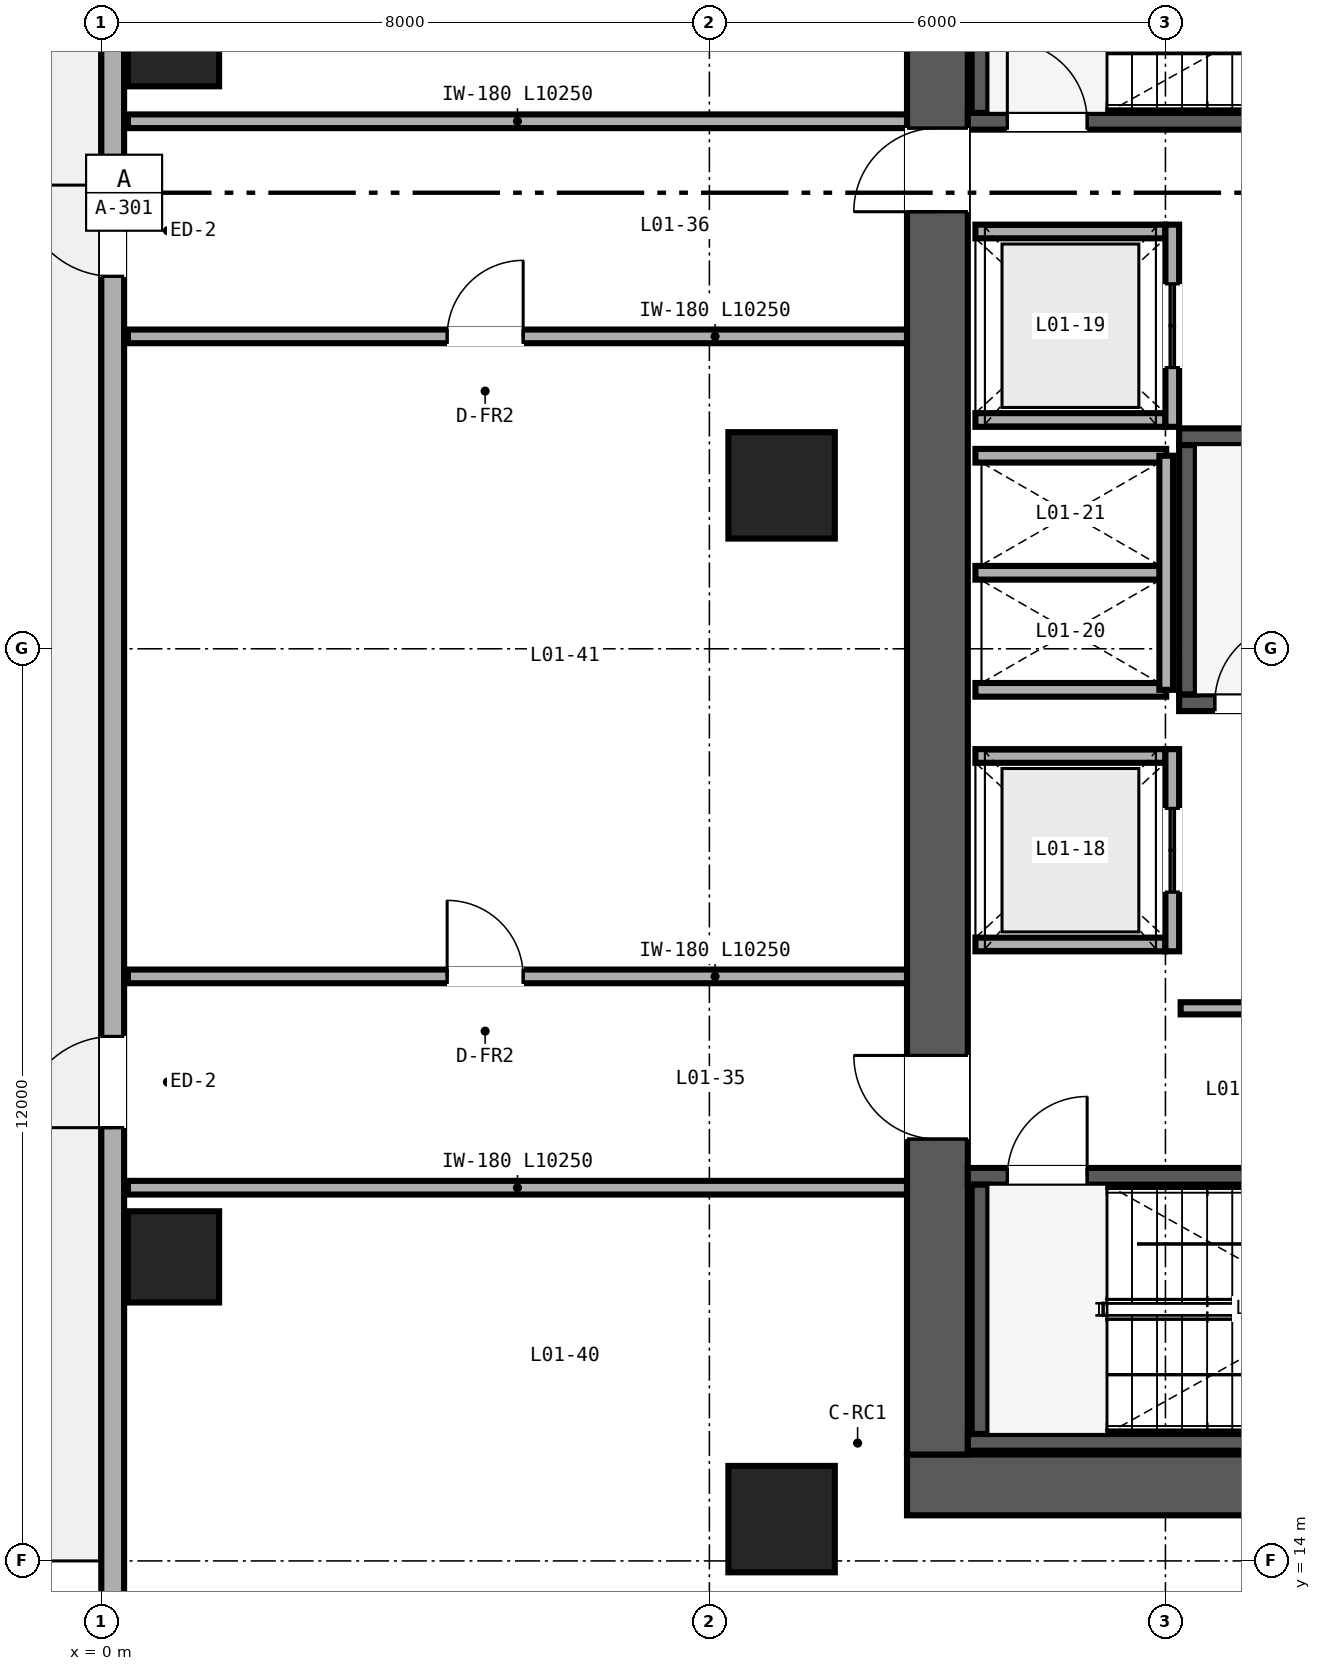
"""IFC4 building model, lengths in metres.
Left out: names, types, materials, properties, quantities, classifications, styles, units other than length and angle.
Written with IfcOpenShell. Run it as: python <this file> out.ifc"""

import sys

from ifc_helpers import new_model, si_unit, direction, frame, frame_2d, origin, origin_2d, place, context, subcontext, project, spatial, rectangle, extrude, source, transform, mapped, element, fill, save


model = new_model("IFC4")
c1 = context("Model", 3, precision=1e-05, world=origin(), true_north=direction((0.0, 1.0)))
c2 = subcontext(c1, "Body", "Model", "MODEL_VIEW")
j1 = project(units=[si_unit("LENGTHUNIT", "METRE"), si_unit("PLANEANGLEUNIT", "RADIAN")], contexts=[c1])
p1 = place(None, origin())
s1 = spatial("IfcSite", under=j1, at=p1, CompositionType="ELEMENT")
p2 = place(p1, origin())
s2 = spatial("IfcBuilding", under=s1, at=p2, CompositionType="ELEMENT")
p3 = place(p2, origin())
s3 = spatial("IfcBuildingStorey", under=s2, at=p3, CompositionType="ELEMENT", Elevation=0.0)
p4 = place(p3, frame((10.6, 15.0, 0.0), z_axis=(0.0, 0.0, 1.0), x_axis=(1.0, 0.0, 0.0)))
e1 = element("IfcWall", 1, at=p4, inside=s3, PredefinedType="SHEAR", context=c2, shape_type="SweptSolid", body=[
    extrude(rectangle(XDim=12.8, YDim=0.8, at=frame_2d((6.4, 0.0))), origin(), (0.0, 0.0, 1.0), 5.71),
])
p5 = place(p4, frame((10.3, 0.0, 0.0)))
e2 = element("IfcOpeningElement", 2, at=p5, cuts=e1, PredefinedType="OPENING", context=c2, shape_type="SweptSolid", body=[
    extrude(rectangle(XDim=1.0, YDim=2.15, at=frame_2d((0.5, 1.075))), frame((0.0, 0.41, 0.0), z_axis=(0.0, -1.0, 0.0), x_axis=(1.0, 0.0, 0.0)), (0.0, 0.0, 1.0), 0.82),
])
p6 = place(p3, frame((11.0, 15.4, 0.0), z_axis=(0.0, 0.0, 1.0), x_axis=(0.0, 1.0, 0.0)))
e3 = element("IfcWall", 3, at=p6, inside=s3, PredefinedType="SHEAR", context=c2, shape_type="SweptSolid", body=[
    extrude(rectangle(XDim=21.2, YDim=0.8, at=frame_2d((10.6, 0.0))), origin(), (0.0, 0.0, 1.0), 5.71),
])
p7 = place(p6, frame((4.15, 0.0, 0.0)))
e4 = element("IfcOpeningElement", 4, at=p7, cuts=e3, PredefinedType="OPENING", context=c2, shape_type="SweptSolid", body=[
    extrude(rectangle(XDim=1.1, YDim=2.15, at=frame_2d((0.55, 1.075))), frame((0.0, 0.41, 0.0), z_axis=(0.0, -1.0, 0.0), x_axis=(1.0, 0.0, 0.0)), (0.0, 0.0, 1.0), 0.82),
])
p8 = place(p6, frame((16.35, 0.0, 0.0)))
e5 = element("IfcOpeningElement", 5, at=p8, cuts=e3, PredefinedType="OPENING", context=c2, shape_type="SweptSolid", body=[
    extrude(rectangle(XDim=1.1, YDim=2.15, at=frame_2d((0.55, 1.075))), frame((0.0, 0.41, 0.0), z_axis=(0.0, -1.0, 0.0), x_axis=(1.0, 0.0, 0.0)), (0.0, 0.0, 1.0), 0.82),
])
p9 = place(p3, frame((11.4, 15.56, 0.0), z_axis=(0.0, 0.0, 1.0), x_axis=(1.0, 0.0, 0.0)))
e6 = element("IfcWall", 6, at=p9, inside=s3, PredefinedType="SHEAR", context=c2, shape_type="SweptSolid", body=[
    extrude(rectangle(XDim=7.91, YDim=0.22, at=frame_2d((3.955, 0.0))), origin(), (0.0, 0.0, 1.0), 5.8),
])
p10 = place(p3, frame((11.4, 19.06, 0.0), z_axis=(0.0, 0.0, 1.0), x_axis=(1.0, 0.0, 0.0)))
e7 = element("IfcWall", 7, at=p10, inside=s3, PredefinedType="SHEAR", context=c2, shape_type="SweptSolid", body=[
    extrude(rectangle(XDim=7.91, YDim=0.22, at=frame_2d((3.955, 0.0))), origin(), (0.0, 0.0, 1.0), 5.8),
])
p11 = place(p10, frame((0.52, 0.0, 0.0)))
e8 = element("IfcOpeningElement", 8, at=p11, cuts=e7, PredefinedType="OPENING", context=c2, shape_type="SweptSolid", body=[
    extrude(rectangle(XDim=1.05, YDim=2.15, at=frame_2d((0.525, 1.075))), frame((0.0, 0.12, 0.0), z_axis=(0.0, -1.0, 0.0), x_axis=(1.0, 0.0, 0.0)), (0.0, 0.0, 1.0), 0.24),
])
p12 = place(p3, frame((11.56, 15.67, 0.0), z_axis=(0.0, 0.0, 1.0), x_axis=(0.0, 1.0, 0.0)))
e9 = element("IfcWall", 9, at=p12, inside=s3, PredefinedType="SHEAR", context=c2, shape_type="SweptSolid", body=[
    extrude(rectangle(XDim=3.28, YDim=0.22, at=frame_2d((1.64, 0.0))), origin(), (0.0, 0.0, 1.0), 5.8),
])
p13 = place(p3, frame((11.4, 32.94, 0.0), z_axis=(0.0, 0.0, 1.0), x_axis=(1.0, 0.0, 0.0)))
e10 = element("IfcWall", 10, at=p13, inside=s3, PredefinedType="SHEAR", context=c2, shape_type="SweptSolid", body=[
    extrude(rectangle(XDim=7.91, YDim=0.22, at=frame_2d((3.955, 0.0))), origin(), (0.0, 0.0, 1.0), 5.8),
])
p14 = place(p13, frame((0.52, 0.0, 0.0)))
e11 = element("IfcOpeningElement", 11, at=p14, cuts=e10, PredefinedType="OPENING", context=c2, shape_type="SweptSolid", body=[
    extrude(rectangle(XDim=1.05, YDim=2.15, at=frame_2d((0.525, 1.075))), frame((0.0, 0.12, 0.0), z_axis=(0.0, -1.0, 0.0), x_axis=(1.0, 0.0, 0.0)), (0.0, 0.0, 1.0), 0.24),
])
p15 = place(p3, frame((11.56, 33.05, 0.0), z_axis=(0.0, 0.0, 1.0), x_axis=(0.0, 1.0, 0.0)))
e12 = element("IfcWall", 12, at=p15, inside=s3, PredefinedType="SHEAR", context=c2, shape_type="SweptSolid", body=[
    extrude(rectangle(XDim=3.28, YDim=0.22, at=frame_2d((1.64, 0.0))), origin(), (0.0, 0.0, 1.0), 5.8),
])
p16 = place(p3, frame((14.18, 25.29, 0.0), z_axis=(0.0, 0.0, 1.0), x_axis=(1.0, 0.0, 0.0)))
e13 = element("IfcWall", 13, at=p16, inside=s3, PredefinedType="SHEAR", context=c2, shape_type="SweptSolid", body=[
    extrude(rectangle(XDim=8.42, YDim=0.22, at=frame_2d((4.21, 0.0))), origin(), (0.0, 0.0, 1.0), 5.8),
])
p17 = place(p16, frame((0.47, 0.0, 0.0)))
e14 = element("IfcOpeningElement", 14, at=p17, cuts=e13, PredefinedType="OPENING", context=c2, shape_type="SweptSolid", body=[
    extrude(rectangle(XDim=1.05, YDim=2.15, at=frame_2d((0.525, 1.075))), frame((0.0, 0.12, 0.0), z_axis=(0.0, -1.0, 0.0), x_axis=(1.0, 0.0, 0.0)), (0.0, 0.0, 1.0), 0.24),
])
p18 = place(p3, frame((14.18, 28.79, 0.0), z_axis=(0.0, 0.0, 1.0), x_axis=(1.0, 0.0, 0.0)))
e15 = element("IfcWall", 15, at=p18, inside=s3, PredefinedType="SHEAR", context=c2, shape_type="SweptSolid", body=[
    extrude(rectangle(XDim=8.42, YDim=0.22, at=frame_2d((4.21, 0.0))), origin(), (0.0, 0.0, 1.0), 5.8),
])
p19 = place(p3, frame((14.29, 25.4, 0.0), z_axis=(0.0, 0.0, 1.0), x_axis=(0.0, 1.0, 0.0)))
e16 = element("IfcWall", 16, at=p19, inside=s3, PredefinedType="SHEAR", context=c2, shape_type="SweptSolid", body=[
    extrude(rectangle(XDim=3.28, YDim=0.22, at=frame_2d((1.64, 0.0))), origin(), (0.0, 0.0, 1.0), 5.8),
])
m1 = source(origin(), c2, "Body", "SweptSolid", [
    extrude(rectangle(XDim=1.2, YDim=1.2, at=origin_2d()), origin(), (0.0, 0.0, 1.0), 5.71),
])
for number, where, z_axis, x_axis in (
    (17, (0.95, 18.0, 0.0), (0.0, 0.0, 1.0), (1.0, 0.0, 0.0)),
    (18, (0.95, 34.0, 0.0), (0.0, 0.0, 1.0), (1.0, 0.0, 0.0)),
):
    element("IfcColumn", number, at=place(p3, frame(where, z_axis=z_axis, x_axis=x_axis)), inside=s3, PredefinedType="COLUMN", context=c2, shape_type="MappedRepresentation", body=[
        mapped(m1, transform((0.0, 0.0, 0.0), scale=1.0)),
    ])
m2 = source(origin(), c2, "Body", "SweptSolid", [
    extrude(rectangle(XDim=1.4, YDim=1.4, at=origin_2d()), origin(), (0.0, 0.0, 1.0), 5.71),
])
for number, where, z_axis, x_axis in (
    (19, (8.95, 14.55, 0.0), (0.0, 0.0, 1.0), (1.0, 0.0, 0.0)),
    (20, (8.95, 28.15, 0.0), (0.0, 0.0, 1.0), (1.0, 0.0, 0.0)),
):
    element("IfcColumn", number, at=place(p3, frame(where, z_axis=z_axis, x_axis=x_axis)), inside=s3, PredefinedType="COLUMN", context=c2, shape_type="MappedRepresentation", body=[
        mapped(m2, transform((0.0, 0.0, 0.0), scale=1.0)),
    ])
p20 = place(p3, frame((0.15, 0.3, 0.0), z_axis=(0.0, 0.0, 1.0), x_axis=(0.0, 1.0, 0.0)))
e21 = element("IfcWall", 21, at=p20, inside=s3, PredefinedType="SOLIDWALL", context=c2, shape_type="SweptSolid", body=[
    extrude(rectangle(XDim=51.4, YDim=0.3, at=frame_2d((25.7, 0.0))), origin(), (0.0, 0.0, 1.0), 5.71),
])
p21 = place(p20, frame((19.4, 0.0, 0.0)))
e22 = element("IfcOpeningElement", 22, at=p21, cuts=e21, PredefinedType="OPENING", context=c2, shape_type="SweptSolid", body=[
    extrude(rectangle(XDim=1.2, YDim=2.2, at=frame_2d((0.6, 1.1))), frame((0.0, 0.16, 0.0), z_axis=(0.0, -1.0, 0.0), x_axis=(1.0, 0.0, 0.0)), (0.0, 0.0, 1.0), 0.32),
])
p22 = place(p20, frame((30.6, 0.0, 0.0)))
e23 = element("IfcOpeningElement", 23, at=p22, cuts=e21, PredefinedType="OPENING", context=c2, shape_type="SweptSolid", body=[
    extrude(rectangle(XDim=1.2, YDim=2.2, at=frame_2d((0.6, 1.1))), frame((0.0, 0.16, 0.0), z_axis=(0.0, -1.0, 0.0), x_axis=(1.0, 0.0, 0.0)), (0.0, 0.0, 1.0), 0.32),
])
p23 = place(p20, frame((40.9, 0.0, 0.0)))
e24 = element("IfcOpeningElement", 24, at=p23, cuts=e21, PredefinedType="OPENING", context=c2, shape_type="SweptSolid", body=[
    extrude(rectangle(XDim=1.2, YDim=2.2, at=frame_2d((0.6, 1.1))), frame((0.0, 0.16, 0.0), z_axis=(0.0, -1.0, 0.0), x_axis=(1.0, 0.0, 0.0)), (0.0, 0.0, 1.0), 0.32),
])
for number, where, z_axis, x_axis in (
    (25, (11.5, 22.11, 0.0), (0.0, 0.0, 1.0), (1.0, 0.0, 0.0)),
    (26, (11.5, 24.59, 0.0), (0.0, 0.0, 1.0), (1.0, 0.0, 0.0)),
):
    element("IfcWall", number, at=place(p3, frame(where, z_axis=z_axis, x_axis=x_axis)), inside=s3, PredefinedType="SOLIDWALL", context=c2, shape_type="SweptSolid", body=[
        extrude(rectangle(XDim=2.5, YDim=0.18, at=frame_2d((1.25, 0.0))), origin(), (0.0, 0.0, 1.0), 5.71),
    ])
p24 = place(p3, frame((14.09, 22.02, 0.0), z_axis=(0.0, 0.0, 1.0), x_axis=(0.0, 1.0, 0.0)))
e27 = element("IfcWall", 27, at=p24, inside=s3, PredefinedType="SOLIDWALL", context=c2, shape_type="SweptSolid", body=[
    extrude(rectangle(XDim=2.66, YDim=0.18, at=frame_2d((1.33, 0.0))), origin(), (0.0, 0.0, 1.0), 5.71),
])
p25 = place(p24, frame((0.78, 0.0, 0.0)))
e28 = element("IfcOpeningElement", 28, at=p25, cuts=e27, PredefinedType="OPENING", context=c2, shape_type="SweptSolid", body=[
    extrude(rectangle(XDim=1.1, YDim=2.2, at=frame_2d((0.55, 1.1))), frame((0.0, 0.1, 0.0), z_axis=(0.0, -1.0, 0.0), x_axis=(1.0, 0.0, 0.0)), (0.0, 0.0, 1.0), 0.2),
])
for number, where, z_axis, x_axis in (
    (29, (11.5, 29.01, 0.0), (0.0, 0.0, 1.0), (1.0, 0.0, 0.0)),
    (30, (11.5, 31.49, 0.0), (0.0, 0.0, 1.0), (1.0, 0.0, 0.0)),
):
    element("IfcWall", number, at=place(p3, frame(where, z_axis=z_axis, x_axis=x_axis)), inside=s3, PredefinedType="SOLIDWALL", context=c2, shape_type="SweptSolid", body=[
        extrude(rectangle(XDim=2.5, YDim=0.18, at=frame_2d((1.25, 0.0))), origin(), (0.0, 0.0, 1.0), 5.71),
    ])
p26 = place(p3, frame((14.09, 28.92, 0.0), z_axis=(0.0, 0.0, 1.0), x_axis=(0.0, 1.0, 0.0)))
e31 = element("IfcWall", 31, at=p26, inside=s3, PredefinedType="SOLIDWALL", context=c2, shape_type="SweptSolid", body=[
    extrude(rectangle(XDim=2.66, YDim=0.18, at=frame_2d((1.33, 0.0))), origin(), (0.0, 0.0, 1.0), 5.71),
])
p27 = place(p26, frame((0.78, 0.0, 0.0)))
e32 = element("IfcOpeningElement", 32, at=p27, cuts=e31, PredefinedType="OPENING", context=c2, shape_type="SweptSolid", body=[
    extrude(rectangle(XDim=1.1, YDim=2.2, at=frame_2d((0.55, 1.1))), frame((0.0, 0.1, 0.0), z_axis=(0.0, -1.0, 0.0), x_axis=(1.0, 0.0, 0.0)), (0.0, 0.0, 1.0), 0.2),
])
for number, where, z_axis, x_axis in (
    (33, (11.5, 25.46, 0.0), (0.0, 0.0, 1.0), (1.0, 0.0, 0.0)),
    (34, (11.5, 27.0, 0.0), (0.0, 0.0, 1.0), (1.0, 0.0, 0.0)),
    (35, (11.5, 28.54, 0.0), (0.0, 0.0, 1.0), (1.0, 0.0, 0.0)),
):
    element("IfcWall", number, at=place(p3, frame(where, z_axis=z_axis, x_axis=x_axis)), inside=s3, PredefinedType="SOLIDWALL", context=c2, shape_type="SweptSolid", body=[
        extrude(rectangle(XDim=2.51, YDim=0.18, at=frame_2d((1.255, 0.0))), origin(), (0.0, 0.0, 1.0), 5.71),
    ])
p28 = place(p3, frame((14.01, 25.46, 0.0), z_axis=(0.0, 0.0, 1.0), x_axis=(0.0, 1.0, 0.0)))
e36 = element("IfcWall", 36, at=p28, inside=s3, PredefinedType="SOLIDWALL", context=c2, shape_type="SweptSolid", body=[
    extrude(rectangle(XDim=3.08, YDim=0.18, at=frame_2d((1.54, 0.0))), origin(), (0.0, 0.0, 1.0), 5.71),
])
p29 = place(p3, frame((14.2, 21.27, 0.0), z_axis=(0.0, 0.0, 1.0), x_axis=(1.0, 0.0, 0.0)))
e37 = element("IfcWall", 37, at=p29, inside=s3, PredefinedType="PARTITIONING", context=c2, shape_type="SweptSolid", body=[
    extrude(rectangle(XDim=4.58, YDim=0.16, at=frame_2d((2.29, 0.0))), origin(), (0.0, 0.0, 1.0), 5.71),
])
p30 = place(p29, frame((1.8, 0.0, 0.0)))
e38 = element("IfcOpeningElement", 38, at=p30, cuts=e37, PredefinedType="OPENING", context=c2, shape_type="SweptSolid", body=[
    extrude(rectangle(XDim=1.0, YDim=2.15, at=frame_2d((0.5, 1.075))), frame((0.0, 0.09, 0.0), z_axis=(0.0, -1.0, 0.0), x_axis=(1.0, 0.0, 0.0)), (0.0, 0.0, 1.0), 0.18),
])
p31 = place(p3, frame((0.35, 18.91, 0.0), z_axis=(0.0, 0.0, 1.0), x_axis=(1.0, 0.0, 0.0)))
e39 = element("IfcWall", 39, at=p31, inside=s3, PredefinedType="SOLIDWALL", context=c2, shape_type="SweptSolid", body=[
    extrude(rectangle(XDim=10.25, YDim=0.18, at=frame_2d((5.125, 0.0))), origin(), (0.0, 0.0, 1.0), 4.931),
])
p32 = place(p3, frame((0.35, 21.69, 0.0), z_axis=(0.0, 0.0, 1.0), x_axis=(1.0, 0.0, 0.0)))
e40 = element("IfcWall", 40, at=p32, inside=s3, PredefinedType="SOLIDWALL", context=c2, shape_type="SweptSolid", body=[
    extrude(rectangle(XDim=10.25, YDim=0.18, at=frame_2d((5.125, 0.0))), origin(), (0.0, 0.0, 1.0), 4.931),
])
p33 = place(p32, frame((4.2, 0.0, 0.0)))
e41 = element("IfcOpeningElement", 41, at=p33, cuts=e40, PredefinedType="OPENING", context=c2, shape_type="SweptSolid", body=[
    extrude(rectangle(XDim=1.0, YDim=2.15, at=frame_2d((0.5, 1.075))), frame((0.0, 0.1, 0.0), z_axis=(0.0, -1.0, 0.0), x_axis=(1.0, 0.0, 0.0)), (0.0, 0.0, 1.0), 0.2),
])
p34 = place(p3, frame((0.35, 30.11, 0.0), z_axis=(0.0, 0.0, 1.0), x_axis=(1.0, 0.0, 0.0)))
e42 = element("IfcWall", 42, at=p34, inside=s3, PredefinedType="SOLIDWALL", context=c2, shape_type="SweptSolid", body=[
    extrude(rectangle(XDim=10.25, YDim=0.18, at=frame_2d((5.125, 0.0))), origin(), (0.0, 0.0, 1.0), 4.931),
])
p35 = place(p34, frame((4.2, 0.0, 0.0)))
e43 = element("IfcOpeningElement", 43, at=p35, cuts=e42, PredefinedType="OPENING", context=c2, shape_type="SweptSolid", body=[
    extrude(rectangle(XDim=1.0, YDim=2.15, at=frame_2d((0.5, 1.075))), frame((0.0, 0.1, 0.0), z_axis=(0.0, -1.0, 0.0), x_axis=(1.0, 0.0, 0.0)), (0.0, 0.0, 1.0), 0.2),
])
p36 = place(p3, frame((0.35, 32.94, 0.0), z_axis=(0.0, 0.0, 1.0), x_axis=(1.0, 0.0, 0.0)))
e44 = element("IfcWall", 44, at=p36, inside=s3, PredefinedType="SOLIDWALL", context=c2, shape_type="SweptSolid", body=[
    extrude(rectangle(XDim=10.25, YDim=0.18, at=frame_2d((5.125, 0.0))), origin(), (0.0, 0.0, 1.0), 4.931),
])
m3 = source(origin(), c2, "Body", "SweptSolid", [
    extrude(rectangle(XDim=1.2, YDim=2.2, at=frame_2d((0.6, 1.1))), frame((0.0, 0.025, 0.0), z_axis=(0.0, -1.0, 0.0), x_axis=(1.0, 0.0, 0.0)), (0.0, 0.0, 1.0), 0.05),
])
p37 = place(p21, origin())
e45 = element("IfcDoor", 45, at=p37, inside=s3, OperationType="SINGLE_SWING_LEFT", PredefinedType="DOOR", context=c2, shape_type="MappedRepresentation", body=[
    mapped(m3, transform((0.0, 0.0, 0.0), scale=1.0)),
])
fill(e22, e45)
p38 = place(p22, origin())
e46 = element("IfcDoor", 46, at=p38, inside=s3, OperationType="SINGLE_SWING_RIGHT", PredefinedType="DOOR", context=c2, shape_type="MappedRepresentation", body=[
    mapped(m3, transform((0.0, 0.0, 0.0), scale=1.0)),
])
fill(e23, e46)
m4 = source(origin(), c2, "Body", "SweptSolid", [
    extrude(rectangle(XDim=1.05, YDim=2.15, at=frame_2d((0.525, 1.075))), frame((0.0, 0.025, 0.0), z_axis=(0.0, -1.0, 0.0), x_axis=(1.0, 0.0, 0.0)), (0.0, 0.0, 1.0), 0.05),
])
p39 = place(p11, origin())
e47 = element("IfcDoor", 47, at=p39, inside=s3, OperationType="SINGLE_SWING_RIGHT", PredefinedType="DOOR", context=c2, shape_type="MappedRepresentation", body=[
    mapped(m4, transform((0.0, 0.0, 0.0), scale=1.0)),
])
fill(e8, e47)
p40 = place(p14, origin())
e48 = element("IfcDoor", 48, at=p40, inside=s3, OperationType="SINGLE_SWING_LEFT", PredefinedType="DOOR", context=c2, shape_type="MappedRepresentation", body=[
    mapped(m4, transform((0.0, 0.0, 0.0), scale=1.0)),
])
fill(e11, e48)
p41 = place(p17, origin())
e49 = element("IfcDoor", 49, at=p41, inside=s3, OperationType="SINGLE_SWING_RIGHT", PredefinedType="DOOR", context=c2, shape_type="MappedRepresentation", body=[
    mapped(m4, transform((0.0, 0.0, 0.0), scale=1.0)),
])
fill(e14, e49)
m5 = source(origin(), c2, "Body", "SweptSolid", [
    extrude(rectangle(XDim=1.1, YDim=2.2, at=frame_2d((0.55, 1.1))), frame((0.0, 0.025, 0.0), z_axis=(0.0, -1.0, 0.0), x_axis=(1.0, 0.0, 0.0)), (0.0, 0.0, 1.0), 0.05),
])
p42 = place(p25, origin())
e50 = element("IfcDoor", 50, at=p42, inside=s3, OperationType="DOUBLE_DOOR_SLIDING", PredefinedType="DOOR", context=c2, shape_type="MappedRepresentation", body=[
    mapped(m5, transform((0.0, 0.0, 0.0), scale=1.0)),
])
fill(e28, e50)
p43 = place(p27, origin())
e51 = element("IfcDoor", 51, at=p43, inside=s3, OperationType="DOUBLE_DOOR_SLIDING", PredefinedType="DOOR", context=c2, shape_type="MappedRepresentation", body=[
    mapped(m5, transform((0.0, 0.0, 0.0), scale=1.0)),
])
fill(e32, e51)
m6 = source(origin(), c2, "Body", "SweptSolid", [
    extrude(rectangle(XDim=1.1, YDim=2.15, at=frame_2d((0.55, 1.075))), frame((0.0, 0.025, 0.0), z_axis=(0.0, -1.0, 0.0), x_axis=(1.0, 0.0, 0.0)), (0.0, 0.0, 1.0), 0.05),
])
p44 = place(p7, origin())
e52 = element("IfcDoor", 52, at=p44, inside=s3, OperationType="SINGLE_SWING_RIGHT", PredefinedType="DOOR", context=c2, shape_type="MappedRepresentation", body=[
    mapped(m6, transform((0.0, 0.0, 0.0), scale=1.0)),
])
fill(e4, e52)
p45 = place(p8, origin())
e53 = element("IfcDoor", 53, at=p45, inside=s3, OperationType="SINGLE_SWING_LEFT", PredefinedType="DOOR", context=c2, shape_type="MappedRepresentation", body=[
    mapped(m6, transform((0.0, 0.0, 0.0), scale=1.0)),
])
fill(e5, e53)
m7 = source(origin(), c2, "Body", "SweptSolid", [
    extrude(rectangle(XDim=1.0, YDim=2.15, at=frame_2d((0.5, 1.075))), frame((0.0, 0.025, 0.0), z_axis=(0.0, -1.0, 0.0), x_axis=(1.0, 0.0, 0.0)), (0.0, 0.0, 1.0), 0.05),
])
p46 = place(p33, origin())
e54 = element("IfcDoor", 54, at=p46, inside=s3, OperationType="SINGLE_SWING_LEFT", PredefinedType="DOOR", context=c2, shape_type="MappedRepresentation", body=[
    mapped(m7, transform((0.0, 0.0, 0.0), scale=1.0)),
])
fill(e41, e54)
p47 = place(p35, origin())
e55 = element("IfcDoor", 55, at=p47, inside=s3, OperationType="SINGLE_SWING_RIGHT", PredefinedType="DOOR", context=c2, shape_type="MappedRepresentation", body=[
    mapped(m7, transform((0.0, 0.0, 0.0), scale=1.0)),
])
fill(e43, e55)
save(model, sys.argv[1])
